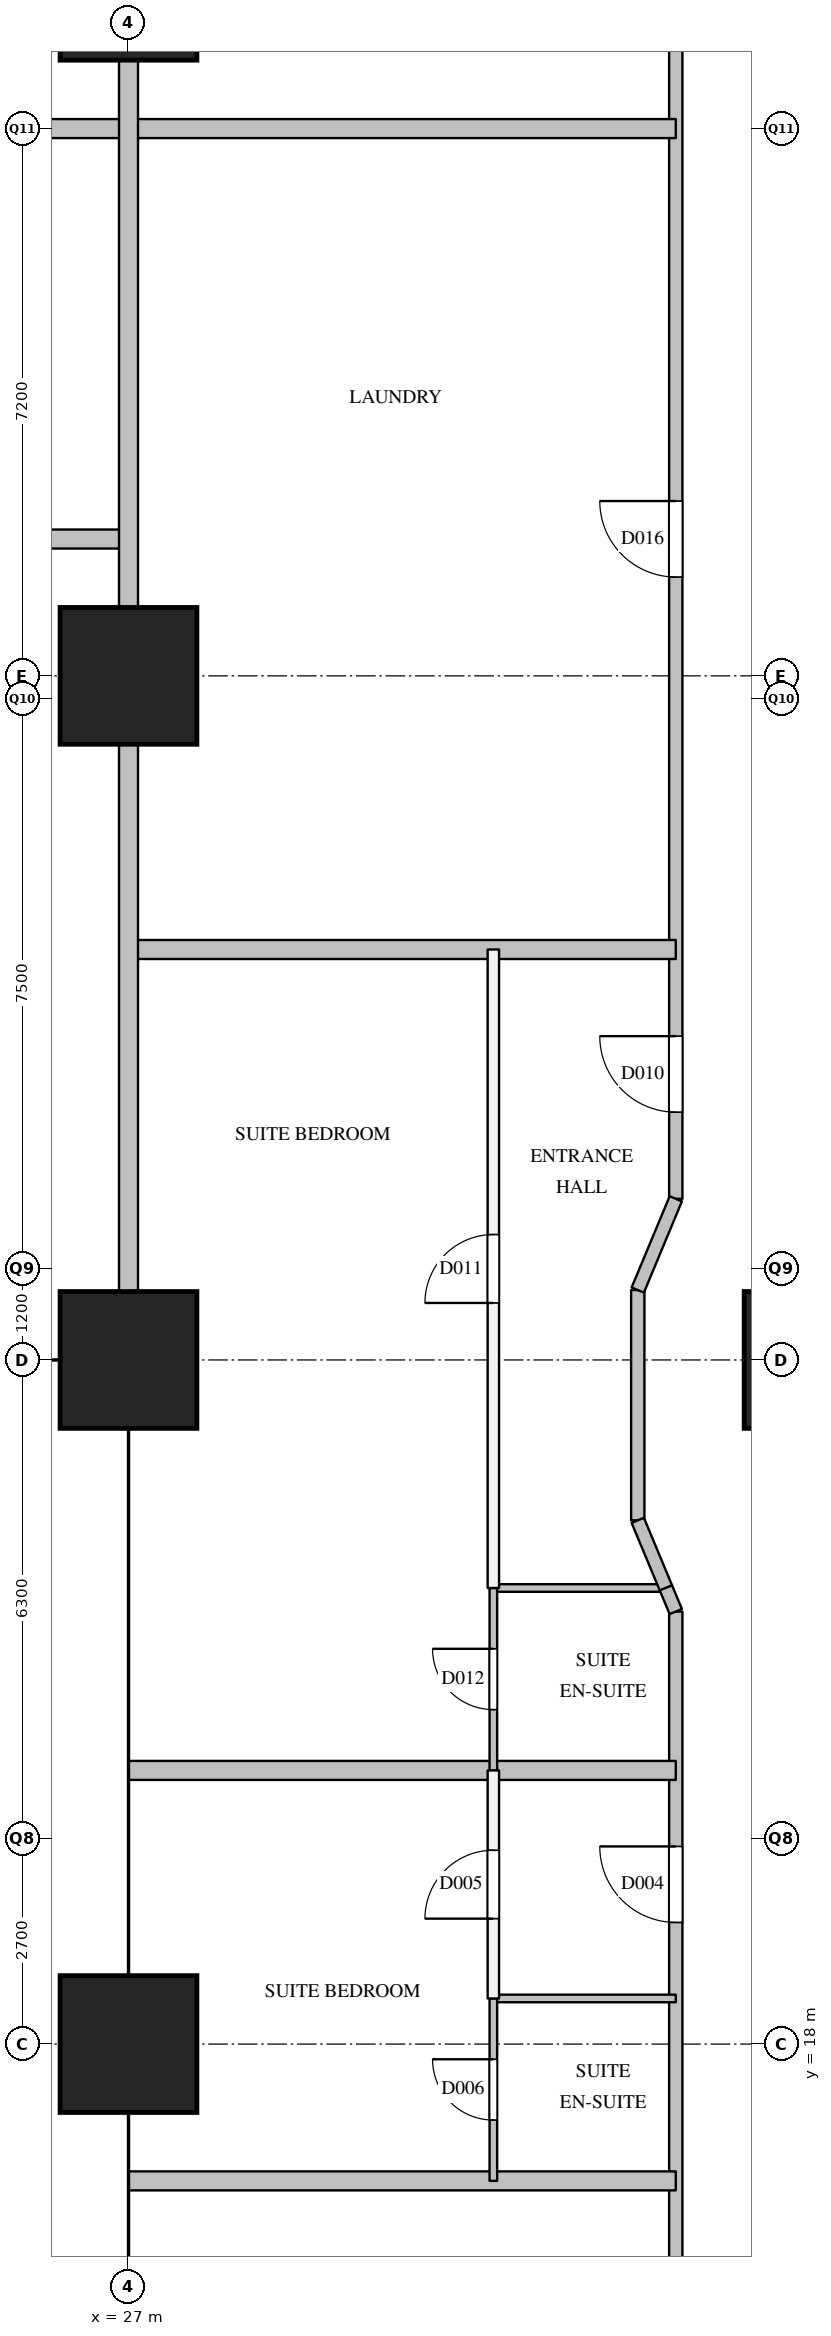
"""IFC4 building model, lengths in metres.
Left out: names, types, materials, properties, quantities, classifications, styles, units other than length and angle.
Written with IfcOpenShell. Run it as: python <this file> out.ifc"""

import sys

from ifc_helpers import new_model, si_unit, direction, frame, frame_2d, origin, origin_2d, place, context, subcontext, project, spatial, rectangle, extrude, element, fill, save


model = new_model("IFC4")
c1 = context("Model", 3, precision=1e-05, world=origin(), true_north=direction((0.0, 1.0)))
c2 = subcontext(c1, "Body", "Model", "MODEL_VIEW")
j1 = project(units=[si_unit("LENGTHUNIT", "METRE"), si_unit("PLANEANGLEUNIT", "RADIAN")], contexts=[c1])
p1 = place(None, origin())
s1 = spatial("IfcSite", under=j1, at=p1, CompositionType="ELEMENT")
p2 = place(p1, origin())
s2 = spatial("IfcBuilding", under=s1, at=p2, CompositionType="ELEMENT")
p3 = place(p2, frame((0.0, 0.0, 89.2)))
s3 = spatial("IfcBuildingStorey", under=s2, at=p3, CompositionType="ELEMENT", Elevation=89.2)
for number, where, z_axis, x_axis in (
    (1, (27.0, 18.0, 0.0), (0.0, 0.0, 1.0), (1.0, 0.0, 0.0)),
    (2, (27.0, 27.0, 0.0), (0.0, 0.0, 1.0), (1.0, 0.0, 0.0)),
    (3, (27.0, 36.0, 0.0), (0.0, 0.0, 1.0), (1.0, 0.0, 0.0)),
    (4, (27.0, 45.0, 0.0), (0.0, 0.0, 1.0), (1.0, 0.0, 0.0)),
    (5, (36.0, 27.0, 0.0), (0.0, 0.0, 1.0), (1.0, 0.0, 0.0)),
):
    element("IfcColumn", number, at=place(p3, frame(where, z_axis=z_axis, x_axis=x_axis)), inside=s3, PredefinedType="COLUMN", context=c2, shape_type="SweptSolid", body=[
        extrude(rectangle(XDim=1.8, YDim=1.8, at=origin_2d()), origin(), (0.0, 0.0, 1.0), 3.8),
    ])
p4 = place(p3, frame((33.7, 24.89, 0.0), z_axis=(0.0, 0.0, 1.0), x_axis=(0.0, 1.0, 0.0)))
e6 = element("IfcWall", 6, at=p4, inside=s3, PredefinedType="PARTITIONING", context=c2, shape_type="SweptSolid", body=[
    extrude(rectangle(XDim=3.03, YDim=0.175, at=frame_2d((1.515, 0.0))), origin(), (0.0, 0.0, 1.0), 2.5),
])
p5 = place(p3, frame((34.2, 7.2, 0.0), z_axis=(0.0, 0.0, 1.0), x_axis=(0.0, 1.0, 0.0)))
e7 = element("IfcWall", 7, at=p5, inside=s3, PredefinedType="PARTITIONING", context=c2, shape_type="SweptSolid", body=[
    extrude(rectangle(XDim=16.49, YDim=0.175, at=frame_2d((8.245, 0.0))), origin(), (0.0, 0.0, 1.0), 3.5),
])
p6 = place(p5, frame((4.05, 0.0, 0.0)))
e8 = element("IfcOpeningElement", 8, at=p6, cuts=e7, PredefinedType="OPENING", context=c2, shape_type="SweptSolid", body=[
    extrude(rectangle(XDim=0.9, YDim=2.1, at=frame_2d((0.45, 1.05))), frame((0.0, 0.097, 0.0), z_axis=(0.0, -1.0, 0.0), x_axis=(1.0, 0.0, 0.0)), (0.0, 0.0, 1.0), 0.195),
])
p7 = place(p5, frame((12.4, 0.0, 0.0)))
e9 = element("IfcOpeningElement", 9, at=p7, cuts=e7, PredefinedType="OPENING", context=c2, shape_type="SweptSolid", body=[
    extrude(rectangle(XDim=1.0, YDim=2.1, at=frame_2d((0.5, 1.05))), frame((0.0, 0.097, 0.0), z_axis=(0.0, -1.0, 0.0), x_axis=(1.0, 0.0, 0.0)), (0.0, 0.0, 1.0), 0.195),
])
p8 = place(p3, frame((34.2, 29.12, 0.0), z_axis=(0.0, 0.0, 1.0), x_axis=(0.0, 1.0, 0.0)))
e10 = element("IfcWall", 10, at=p8, inside=s3, PredefinedType="PARTITIONING", context=c2, shape_type="SweptSolid", body=[
    extrude(rectangle(XDim=22.68, YDim=0.175, at=frame_2d((11.34, 0.0))), origin(), (0.0, 0.0, 1.0), 3.5),
])
p9 = place(p8, frame((1.14, 0.0, 0.0)))
e11 = element("IfcOpeningElement", 11, at=p9, cuts=e10, PredefinedType="OPENING", context=c2, shape_type="SweptSolid", body=[
    extrude(rectangle(XDim=1.0, YDim=2.1, at=frame_2d((0.5, 1.05))), frame((0.0, 0.097, 0.0), z_axis=(0.0, -1.0, 0.0), x_axis=(1.0, 0.0, 0.0)), (0.0, 0.0, 1.0), 0.195),
])
p10 = place(p8, frame((8.18, 0.0, 0.0)))
e12 = element("IfcOpeningElement", 12, at=p10, cuts=e10, PredefinedType="OPENING", context=c2, shape_type="SweptSolid", body=[
    extrude(rectangle(XDim=1.0, YDim=2.1, at=frame_2d((0.5, 1.05))), frame((0.0, 0.097, 0.0), z_axis=(0.0, -1.0, 0.0), x_axis=(1.0, 0.0, 0.0)), (0.0, 0.0, 1.0), 0.195),
])
p11 = place(p8, frame((17.93, 0.0, 0.0)))
e13 = element("IfcOpeningElement", 13, at=p11, cuts=e10, PredefinedType="OPENING", context=c2, shape_type="SweptSolid", body=[
    extrude(rectangle(XDim=0.9, YDim=2.1, at=frame_2d((0.45, 1.05))), frame((0.0, 0.097, 0.0), z_axis=(0.0, -1.0, 0.0), x_axis=(1.0, 0.0, 0.0)), (0.0, 0.0, 1.0), 0.195),
])
p12 = place(p3, frame((31.8, 18.6, 0.0), z_axis=(0.0, 0.0, 1.0), x_axis=(0.0, 1.0, 0.0)))
e14 = element("IfcWall", 14, at=p12, inside=s3, PredefinedType="PARTITIONING", context=c2, shape_type="SweptSolid", body=[
    extrude(rectangle(XDim=3.0, YDim=0.15, at=frame_2d((1.5, 0.0))), origin(), (0.0, 0.0, 1.0), 3.5),
])
p13 = place(p12, frame((1.05, 0.0, 0.0)))
e15 = element("IfcOpeningElement", 15, at=p13, cuts=e14, PredefinedType="OPENING", context=c2, shape_type="SweptSolid", body=[
    extrude(rectangle(XDim=0.9, YDim=2.1, at=frame_2d((0.45, 1.05))), frame((0.0, 0.085, 0.0), z_axis=(0.0, -1.0, 0.0), x_axis=(1.0, 0.0, 0.0)), (0.0, 0.0, 1.0), 0.17),
])
p14 = place(p3, frame((31.8, 24.0, 0.0), z_axis=(0.0, 0.0, 1.0), x_axis=(0.0, 1.0, 0.0)))
e16 = element("IfcWall", 16, at=p14, inside=s3, PredefinedType="PARTITIONING", context=c2, shape_type="SweptSolid", body=[
    extrude(rectangle(XDim=8.4, YDim=0.15, at=frame_2d((4.2, 0.0))), origin(), (0.0, 0.0, 1.0), 2.5),
])
p15 = place(p14, frame((3.75, 0.0, 0.0)))
e17 = element("IfcOpeningElement", 17, at=p15, cuts=e16, PredefinedType="OPENING", context=c2, shape_type="SweptSolid", body=[
    extrude(rectangle(XDim=0.9, YDim=2.1, at=frame_2d((0.45, 1.05))), frame((0.0, 0.085, 0.0), z_axis=(0.0, -1.0, 0.0), x_axis=(1.0, 0.0, 0.0)), (0.0, 0.0, 1.0), 0.17),
])
for number, where, z_axis, x_axis in (
    (18, (27.0, 16.2, 0.0), (0.0, 0.0, 1.0), (1.0, 0.0, 0.0)),
    (19, (27.0, 21.6, 0.0), (0.0, 0.0, 1.0), (1.0, 0.0, 0.0)),
    (20, (27.0, 32.4, 0.0), (0.0, 0.0, 1.0), (1.0, 0.0, 0.0)),
    (21, (19.8, 37.8, 0.0), (0.0, 0.0, 1.0), (1.0, 0.0, 0.0)),
):
    element("IfcWall", number, at=place(p3, frame(where, z_axis=z_axis, x_axis=x_axis)), inside=s3, PredefinedType="PARTITIONING", context=c2, shape_type="SweptSolid", body=[
        extrude(rectangle(XDim=7.2, YDim=0.25, at=frame_2d((3.6, 0.0))), origin(), (0.0, 0.0, 1.0), 2.5),
    ])
p16 = place(p3, frame((19.8, 43.2, 0.0), z_axis=(0.0, 0.0, 1.0), x_axis=(1.0, 0.0, 0.0)))
e22 = element("IfcWall", 22, at=p16, inside=s3, PredefinedType="PARTITIONING", context=c2, shape_type="SweptSolid", body=[
    extrude(rectangle(XDim=14.4, YDim=0.25, at=frame_2d((7.2, 0.0))), origin(), (0.0, 0.0, 1.0), 2.5),
])
p17 = place(p3, frame((27.0, 27.0, 0.0), z_axis=(0.0, 0.0, 1.0), x_axis=(0.0, 1.0, 0.0)))
e23 = element("IfcWall", 23, at=p17, inside=s3, PredefinedType="PARTITIONING", context=c2, shape_type="SweptSolid", body=[
    extrude(rectangle(XDim=27.0, YDim=0.25, at=frame_2d((13.5, 0.0))), origin(), (0.0, 0.0, 1.0), 2.5),
])
p18 = place(p3, frame((31.8, 18.6, 0.0), z_axis=(0.0, 0.0, 1.0), x_axis=(1.0, 0.0, 0.0)))
e24 = element("IfcWall", 24, at=p18, inside=s3, PredefinedType="PARTITIONING", context=c2, shape_type="SweptSolid", body=[
    extrude(rectangle(XDim=2.4, YDim=0.1, at=frame_2d((1.2, 0.0))), origin(), (0.0, 0.0, 1.0), 3.5),
])
p19 = place(p3, frame((31.8, 24.0, 0.0), z_axis=(0.0, 0.0, 1.0), x_axis=(1.0, 0.0, 0.0)))
e25 = element("IfcWall", 25, at=p19, inside=s3, PredefinedType="PARTITIONING", context=c2, shape_type="SweptSolid", body=[
    extrude(rectangle(XDim=2.271, YDim=0.1, at=frame_2d((1.135, 0.0))), origin(), (0.0, 0.0, 1.0), 3.5),
])
p20 = place(p3, frame((31.8, 16.2, 0.0), z_axis=(0.0, 0.0, 1.0), x_axis=(0.0, 1.0, 0.0)))
e26 = element("IfcWall", 26, at=p20, inside=s3, PredefinedType="PARTITIONING", context=c2, shape_type="SweptSolid", body=[
    extrude(rectangle(XDim=2.4, YDim=0.1, at=frame_2d((1.2, 0.0))), origin(), (0.0, 0.0, 1.0), 3.5),
])
p21 = place(p20, frame((0.8, 0.0, 0.0)))
e27 = element("IfcOpeningElement", 27, at=p21, cuts=e26, PredefinedType="OPENING", context=c2, shape_type="SweptSolid", body=[
    extrude(rectangle(XDim=0.8, YDim=2.1, at=frame_2d((0.4, 1.05))), frame((0.0, 0.06, 0.0), z_axis=(0.0, -1.0, 0.0), x_axis=(1.0, 0.0, 0.0)), (0.0, 0.0, 1.0), 0.12),
])
p22 = place(p3, frame((31.8, 21.6, 0.0), z_axis=(0.0, 0.0, 1.0), x_axis=(0.0, 1.0, 0.0)))
e28 = element("IfcWall", 28, at=p22, inside=s3, PredefinedType="PARTITIONING", context=c2, shape_type="SweptSolid", body=[
    extrude(rectangle(XDim=2.4, YDim=0.1, at=frame_2d((1.2, 0.0))), origin(), (0.0, 0.0, 1.0), 3.5),
])
p23 = place(p22, frame((0.8, 0.0, 0.0)))
e29 = element("IfcOpeningElement", 29, at=p23, cuts=e28, PredefinedType="OPENING", context=c2, shape_type="SweptSolid", body=[
    extrude(rectangle(XDim=0.8, YDim=2.1, at=frame_2d((0.4, 1.05))), frame((0.0, 0.06, 0.0), z_axis=(0.0, -1.0, 0.0), x_axis=(1.0, 0.0, 0.0)), (0.0, 0.0, 1.0), 0.12),
])
p24 = place(p3, frame((34.072, 23.998, 0.0), z_axis=(0.0, 0.0, 1.0), x_axis=(-0.384687170746, 0.923047008913, 0.0)))
e30 = element("IfcWall", 30, at=p24, inside=s3, PredefinedType="PARTITIONING", context=c2, shape_type="SweptSolid", body=[
    extrude(rectangle(XDim=0.966, YDim=0.175, at=frame_2d((0.483, 0.0))), origin(), (0.0, 0.0, 1.0), 3.5),
])
p25 = place(p3, frame((33.7, 27.92, 0.0), z_axis=(0.0, 0.0, 1.0), x_axis=(0.384562051588, 0.923099143363, 0.0)))
e31 = element("IfcWall", 31, at=p25, inside=s3, PredefinedType="PARTITIONING", context=c2, shape_type="SweptSolid", body=[
    extrude(rectangle(XDim=1.3, YDim=0.175, at=frame_2d((0.65, 0.0))), origin(), (0.0, 0.0, 1.0), 3.5),
])
p26 = place(p3, frame((34.2, 23.69, 0.0), z_axis=(0.0, 0.0, 1.0), x_axis=(-0.384307602557, 0.92320510539, 0.0)))
e32 = element("IfcWall", 32, at=p26, inside=s3, PredefinedType="PARTITIONING", context=c2, shape_type="SweptSolid", body=[
    extrude(rectangle(XDim=0.338, YDim=0.175, at=frame_2d((0.169, 0.0))), origin(), (0.0, 0.0, 1.0), 3.5),
])
p27 = place(p7, origin())
e33 = element("IfcDoor", 33, at=p27, inside=s3, OperationType="SINGLE_SWING_RIGHT", PredefinedType="DOOR", context=c2, shape_type="SweptSolid", body=[
    extrude(rectangle(XDim=1.0, YDim=2.1, at=frame_2d((0.5, 1.05))), frame((0.0, 0.025, 0.0), z_axis=(0.0, -1.0, 0.0), x_axis=(1.0, 0.0, 0.0)), (0.0, 0.0, 1.0), 0.05),
])
fill(e9, e33)
p28 = place(p13, origin())
e34 = element("IfcDoor", 34, at=p28, inside=s3, OperationType="SINGLE_SWING_LEFT", PredefinedType="DOOR", context=c2, shape_type="SweptSolid", body=[
    extrude(rectangle(XDim=0.9, YDim=2.1, at=frame_2d((0.45, 1.05))), frame((0.0, 0.025, 0.0), z_axis=(0.0, -1.0, 0.0), x_axis=(1.0, 0.0, 0.0)), (0.0, 0.0, 1.0), 0.05),
])
fill(e15, e34)
p29 = place(p21, origin())
e35 = element("IfcDoor", 35, at=p29, inside=s3, OperationType="SINGLE_SWING_RIGHT", PredefinedType="DOOR", context=c2, shape_type="SweptSolid", body=[
    extrude(rectangle(XDim=0.8, YDim=2.1, at=frame_2d((0.4, 1.05))), frame((0.0, 0.025, 0.0), z_axis=(0.0, -1.0, 0.0), x_axis=(1.0, 0.0, 0.0)), (0.0, 0.0, 1.0), 0.05),
])
fill(e27, e35)
p30 = place(p9, origin())
e36 = element("IfcDoor", 36, at=p30, inside=s3, OperationType="SINGLE_SWING_RIGHT", PredefinedType="DOOR", context=c2, shape_type="SweptSolid", body=[
    extrude(rectangle(XDim=1.0, YDim=2.1, at=frame_2d((0.5, 1.05))), frame((0.0, 0.025, 0.0), z_axis=(0.0, -1.0, 0.0), x_axis=(1.0, 0.0, 0.0)), (0.0, 0.0, 1.0), 0.05),
])
fill(e11, e36)
p31 = place(p15, origin())
e37 = element("IfcDoor", 37, at=p31, inside=s3, OperationType="SINGLE_SWING_LEFT", PredefinedType="DOOR", context=c2, shape_type="SweptSolid", body=[
    extrude(rectangle(XDim=0.9, YDim=2.1, at=frame_2d((0.45, 1.05))), frame((0.0, 0.025, 0.0), z_axis=(0.0, -1.0, 0.0), x_axis=(1.0, 0.0, 0.0)), (0.0, 0.0, 1.0), 0.05),
])
fill(e17, e37)
p32 = place(p23, origin())
e38 = element("IfcDoor", 38, at=p32, inside=s3, OperationType="SINGLE_SWING_RIGHT", PredefinedType="DOOR", context=c2, shape_type="SweptSolid", body=[
    extrude(rectangle(XDim=0.8, YDim=2.1, at=frame_2d((0.4, 1.05))), frame((0.0, 0.025, 0.0), z_axis=(0.0, -1.0, 0.0), x_axis=(1.0, 0.0, 0.0)), (0.0, 0.0, 1.0), 0.05),
])
fill(e29, e38)
p33 = place(p10, origin())
e39 = element("IfcDoor", 39, at=p33, inside=s3, OperationType="SINGLE_SWING_RIGHT", PredefinedType="DOOR", context=c2, shape_type="SweptSolid", body=[
    extrude(rectangle(XDim=1.0, YDim=2.1, at=frame_2d((0.5, 1.05))), frame((0.0, 0.025, 0.0), z_axis=(0.0, -1.0, 0.0), x_axis=(1.0, 0.0, 0.0)), (0.0, 0.0, 1.0), 0.05),
])
fill(e12, e39)
save(model, sys.argv[1])
